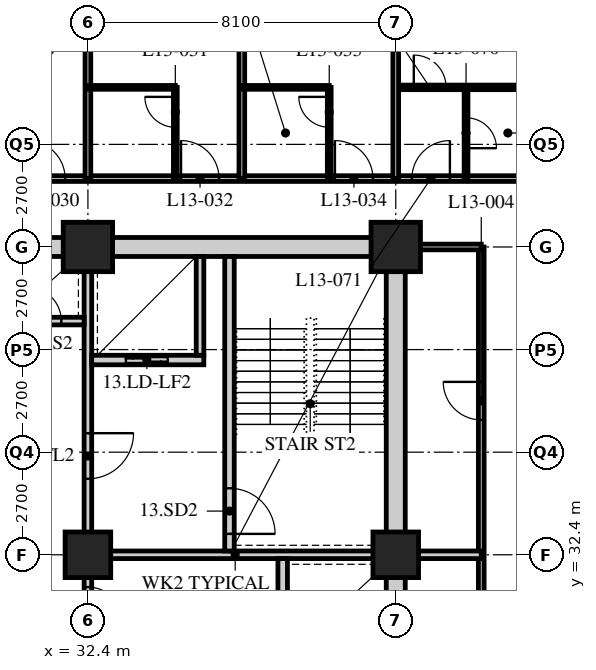
"""IFC4 building model, lengths in metres.
Left out: names, types, materials, properties, quantities, classifications, styles, units other than length and angle.
Written with IfcOpenShell. Run it as: python <this file> out.ifc"""

import sys

from ifc_helpers import new_model, si_unit, direction, frame, frame_2d, origin, origin_2d, place, context, subcontext, project, spatial, rectangle, hollow_rectangle, extrude, element, fill, save


model = new_model("IFC4")
c1 = context("Model", 3, precision=1e-05, world=origin(), true_north=direction((0.0, 1.0)))
c2 = subcontext(c1, "Body", "Model", "MODEL_VIEW")
j1 = project(units=[si_unit("LENGTHUNIT", "METRE"), si_unit("PLANEANGLEUNIT", "RADIAN")], contexts=[c1])
p1 = place(None, origin())
s1 = spatial("IfcSite", under=j1, at=p1, CompositionType="ELEMENT")
p2 = place(p1, origin())
s2 = spatial("IfcBuilding", under=s1, at=p2, CompositionType="ELEMENT")
p3 = place(p2, frame((0.0, 0.0, 56.8)))
s3 = spatial("IfcBuildingStorey", under=s2, at=p3, CompositionType="ELEMENT", Elevation=56.8)
p4 = place(p3, frame((32.4, 32.4, 0.0), z_axis=(0.0, 0.0, 1.0), x_axis=(1.0, 0.0, 0.0)))
e1 = element("IfcColumn", 1, at=p4, inside=s3, PredefinedType="COLUMN", context=c2, shape_type="SweptSolid", body=[
    extrude(hollow_rectangle(XDim=1.2, YDim=1.2, WallThickness=0.12, at=origin_2d()), origin(), (0.0, 0.0, 1.0), 3.4),
])
p5 = place(p3, frame((32.4, 40.5, 0.0), z_axis=(0.0, 0.0, 1.0), x_axis=(1.0, 0.0, 0.0)))
e2 = element("IfcColumn", 2, at=p5, inside=s3, PredefinedType="COLUMN", context=c2, shape_type="SweptSolid", body=[
    extrude(hollow_rectangle(XDim=1.3, YDim=1.3, WallThickness=0.13, at=origin_2d()), origin(), (0.0, 0.0, 1.0), 3.4),
])
p6 = place(p3, frame((40.5, 32.4, 0.0), z_axis=(0.0, 0.0, 1.0), x_axis=(1.0, 0.0, 0.0)))
e3 = element("IfcColumn", 3, at=p6, inside=s3, PredefinedType="COLUMN", context=c2, shape_type="SweptSolid", body=[
    extrude(hollow_rectangle(XDim=1.2, YDim=1.2, WallThickness=0.12, at=origin_2d()), origin(), (0.0, 0.0, 1.0), 3.4),
])
p7 = place(p3, frame((40.5, 40.5, 0.0), z_axis=(0.0, 0.0, 1.0), x_axis=(1.0, 0.0, 0.0)))
e4 = element("IfcColumn", 4, at=p7, inside=s3, PredefinedType="COLUMN", context=c2, shape_type="SweptSolid", body=[
    extrude(hollow_rectangle(XDim=1.3, YDim=1.3, WallThickness=0.13, at=origin_2d()), origin(), (0.0, 0.0, 1.0), 3.4),
])
p8 = place(p3, frame((12.15, 42.3, 0.0), z_axis=(0.0, 0.0, 1.0), x_axis=(1.0, 0.0, 0.0)))
e5 = element("IfcWall", 5, at=p8, inside=s3, PredefinedType="PARTITIONING", context=c2, shape_type="SweptSolid", body=[
    extrude(rectangle(XDim=32.4, YDim=0.15, at=frame_2d((16.2, 0.0))), origin(), (0.0, 0.0, 1.0), 3.19),
])
p9 = place(p8, frame((6.5, 0.0, 0.0)))
e6 = element("IfcOpeningElement", 6, at=p9, cuts=e5, PredefinedType="OPENING", context=c2, shape_type="SweptSolid", body=[
    extrude(rectangle(XDim=1.0, YDim=2.1, at=frame_2d((0.5, 1.05))), frame((0.0, 0.085, 0.0), z_axis=(0.0, -1.0, 0.0), x_axis=(1.0, 0.0, 0.0)), (0.0, 0.0, 1.0), 0.17),
])
p10 = place(p8, frame((10.55, 0.0, 0.0)))
e7 = element("IfcOpeningElement", 7, at=p10, cuts=e5, PredefinedType="OPENING", context=c2, shape_type="SweptSolid", body=[
    extrude(rectangle(XDim=1.0, YDim=2.1, at=frame_2d((0.5, 1.05))), frame((0.0, 0.085, 0.0), z_axis=(0.0, -1.0, 0.0), x_axis=(1.0, 0.0, 0.0)), (0.0, 0.0, 1.0), 0.17),
])
p11 = place(p8, frame((14.6, 0.0, 0.0)))
e8 = element("IfcOpeningElement", 8, at=p11, cuts=e5, PredefinedType="OPENING", context=c2, shape_type="SweptSolid", body=[
    extrude(rectangle(XDim=1.0, YDim=2.1, at=frame_2d((0.5, 1.05))), frame((0.0, 0.085, 0.0), z_axis=(0.0, -1.0, 0.0), x_axis=(1.0, 0.0, 0.0)), (0.0, 0.0, 1.0), 0.17),
])
p12 = place(p8, frame((18.65, 0.0, 0.0)))
e9 = element("IfcOpeningElement", 9, at=p12, cuts=e5, PredefinedType="OPENING", context=c2, shape_type="SweptSolid", body=[
    extrude(rectangle(XDim=1.0, YDim=2.1, at=frame_2d((0.5, 1.05))), frame((0.0, 0.085, 0.0), z_axis=(0.0, -1.0, 0.0), x_axis=(1.0, 0.0, 0.0)), (0.0, 0.0, 1.0), 0.17),
])
p13 = place(p8, frame((22.7, 0.0, 0.0)))
e10 = element("IfcOpeningElement", 10, at=p13, cuts=e5, PredefinedType="OPENING", context=c2, shape_type="SweptSolid", body=[
    extrude(rectangle(XDim=1.0, YDim=2.1, at=frame_2d((0.5, 1.05))), frame((0.0, 0.085, 0.0), z_axis=(0.0, -1.0, 0.0), x_axis=(1.0, 0.0, 0.0)), (0.0, 0.0, 1.0), 0.17),
])
p14 = place(p8, frame((26.75, 0.0, 0.0)))
e11 = element("IfcOpeningElement", 11, at=p14, cuts=e5, PredefinedType="OPENING", context=c2, shape_type="SweptSolid", body=[
    extrude(rectangle(XDim=1.0, YDim=2.1, at=frame_2d((0.5, 1.05))), frame((0.0, 0.085, 0.0), z_axis=(0.0, -1.0, 0.0), x_axis=(1.0, 0.0, 0.0)), (0.0, 0.0, 1.0), 0.17),
])
p15 = place(p8, frame((28.775, 0.0, 0.0)))
e12 = element("IfcOpeningElement", 12, at=p15, cuts=e5, PredefinedType="OPENING", context=c2, shape_type="SweptSolid", body=[
    extrude(rectangle(XDim=1.0, YDim=2.1, at=frame_2d((0.5, 1.05))), frame((0.0, 0.085, 0.0), z_axis=(0.0, -1.0, 0.0), x_axis=(1.0, 0.0, 0.0)), (0.0, 0.0, 1.0), 0.17),
])
p16 = place(p8, frame((2.625, 0.0, 0.0)))
e13 = element("IfcOpeningElement", 13, at=p16, cuts=e5, PredefinedType="OPENING", context=c2, shape_type="SweptSolid", body=[
    extrude(rectangle(XDim=1.0, YDim=2.1, at=frame_2d((0.5, 1.05))), frame((0.0, 0.085, 0.0), z_axis=(0.0, -1.0, 0.0), x_axis=(1.0, 0.0, 0.0)), (0.0, 0.0, 1.0), 0.17),
])
p17 = place(p3, frame((42.75, 13.95, 0.0), z_axis=(0.0, 0.0, 1.0), x_axis=(0.0, 1.0, 0.0)))
e14 = element("IfcWall", 14, at=p17, inside=s3, PredefinedType="PARTITIONING", context=c2, shape_type="SweptSolid", body=[
    extrude(rectangle(XDim=26.55, YDim=0.15, at=frame_2d((13.275, 0.0))), origin(), (0.0, 0.0, 1.0), 3.19),
])
p18 = place(p17, frame((13.9, 0.0, 0.0)))
e15 = element("IfcOpeningElement", 15, at=p18, cuts=e14, PredefinedType="OPENING", context=c2, shape_type="SweptSolid", body=[
    extrude(rectangle(XDim=1.0, YDim=2.1, at=frame_2d((0.5, 1.05))), frame((0.0, 0.085, 0.0), z_axis=(0.0, -1.0, 0.0), x_axis=(1.0, 0.0, 0.0)), (0.0, 0.0, 1.0), 0.17),
])
p19 = place(p17, frame((22.0, 0.0, 0.0)))
e16 = element("IfcOpeningElement", 16, at=p19, cuts=e14, PredefinedType="OPENING", context=c2, shape_type="SweptSolid", body=[
    extrude(rectangle(XDim=1.0, YDim=2.1, at=frame_2d((0.5, 1.05))), frame((0.0, 0.085, 0.0), z_axis=(0.0, -1.0, 0.0), x_axis=(1.0, 0.0, 0.0)), (0.0, 0.0, 1.0), 0.17),
])
p20 = place(p3, frame((42.75, 40.5, 0.0), z_axis=(0.0, 0.0, 1.0), x_axis=(-1.0, 0.0, 0.0)))
e17 = element("IfcWall", 17, at=p20, inside=s3, PredefinedType="PARTITIONING", context=c2, shape_type="SweptSolid", body=[
    extrude(rectangle(XDim=2.05, YDim=0.15, at=frame_2d((1.025, 0.0))), origin(), (0.0, 0.0, 1.0), 2.578),
])
p21 = place(p3, frame((40.5, 32.4, 0.0), z_axis=(0.0, 0.0, 1.0), x_axis=(1.0, 0.0, 0.0)))
e18 = element("IfcWall", 18, at=p21, inside=s3, PredefinedType="SOLIDWALL", context=c2, shape_type="SweptSolid", body=[
    extrude(rectangle(XDim=2.25, YDim=0.2, at=frame_2d((1.125, 0.0))), origin(), (0.0, 0.0, 1.0), 2.578),
])
p22 = place(p3, frame((32.4, 42.3, 0.0), z_axis=(0.0, 0.0, 1.0), x_axis=(0.0, 1.0, 0.0)))
e19 = element("IfcWall", 19, at=p22, inside=s3, PredefinedType="PARTITIONING", context=c2, shape_type="SweptSolid", body=[
    extrude(rectangle(XDim=6.0, YDim=0.15, at=frame_2d((3.0, 0.0))), origin(), (0.0, 0.0, 1.0), 2.578),
])
p23 = place(p3, frame((32.4, 44.7, 0.0), z_axis=(0.0, 0.0, 1.0), x_axis=(1.0, 0.0, 0.0)))
e20 = element("IfcWall", 20, at=p23, inside=s3, PredefinedType="PARTITIONING", context=c2, shape_type="SweptSolid", body=[
    extrude(rectangle(XDim=2.3, YDim=0.1, at=frame_2d((1.15, 0.0))), origin(), (0.0, 0.0, 1.0), 3.19),
])
p24 = place(p3, frame((34.7, 42.3, 0.0), z_axis=(0.0, 0.0, 1.0), x_axis=(0.0, 1.0, 0.0)))
e21 = element("IfcWall", 21, at=p24, inside=s3, PredefinedType="PARTITIONING", context=c2, shape_type="SweptSolid", body=[
    extrude(rectangle(XDim=2.4, YDim=0.1, at=frame_2d((1.2, 0.0))), origin(), (0.0, 0.0, 1.0), 3.19),
])
p25 = place(p24, frame((1.35, 0.0, 0.0)))
e22 = element("IfcOpeningElement", 22, at=p25, cuts=e21, PredefinedType="OPENING", context=c2, shape_type="SweptSolid", body=[
    extrude(rectangle(XDim=0.8, YDim=2.1, at=frame_2d((0.4, 1.05))), frame((0.0, 0.06, 0.0), z_axis=(0.0, -1.0, 0.0), x_axis=(1.0, 0.0, 0.0)), (0.0, 0.0, 1.0), 0.12),
])
p26 = place(p3, frame((36.45, 42.3, 0.0), z_axis=(0.0, 0.0, 1.0), x_axis=(0.0, 1.0, 0.0)))
e23 = element("IfcWall", 23, at=p26, inside=s3, PredefinedType="PARTITIONING", context=c2, shape_type="SweptSolid", body=[
    extrude(rectangle(XDim=6.0, YDim=0.15, at=frame_2d((3.0, 0.0))), origin(), (0.0, 0.0, 1.0), 3.19),
])
p27 = place(p3, frame((36.45, 44.7, 0.0), z_axis=(0.0, 0.0, 1.0), x_axis=(1.0, 0.0, 0.0)))
e24 = element("IfcWall", 24, at=p27, inside=s3, PredefinedType="PARTITIONING", context=c2, shape_type="SweptSolid", body=[
    extrude(rectangle(XDim=2.3, YDim=0.1, at=frame_2d((1.15, 0.0))), origin(), (0.0, 0.0, 1.0), 3.19),
])
p28 = place(p3, frame((38.75, 42.3, 0.0), z_axis=(0.0, 0.0, 1.0), x_axis=(0.0, 1.0, 0.0)))
e25 = element("IfcWall", 25, at=p28, inside=s3, PredefinedType="PARTITIONING", context=c2, shape_type="SweptSolid", body=[
    extrude(rectangle(XDim=2.4, YDim=0.1, at=frame_2d((1.2, 0.0))), origin(), (0.0, 0.0, 1.0), 3.19),
])
p29 = place(p28, frame((1.35, 0.0, 0.0)))
e26 = element("IfcOpeningElement", 26, at=p29, cuts=e25, PredefinedType="OPENING", context=c2, shape_type="SweptSolid", body=[
    extrude(rectangle(XDim=0.8, YDim=2.1, at=frame_2d((0.4, 1.05))), frame((0.0, 0.06, 0.0), z_axis=(0.0, -1.0, 0.0), x_axis=(1.0, 0.0, 0.0)), (0.0, 0.0, 1.0), 0.12),
])
p30 = place(p3, frame((40.5, 44.7, 0.0), z_axis=(0.0, 0.0, 1.0), x_axis=(1.0, 0.0, 0.0)))
e27 = element("IfcWall", 27, at=p30, inside=s3, PredefinedType="PARTITIONING", context=c2, shape_type="SweptSolid", body=[
    extrude(rectangle(XDim=4.05, YDim=0.12, at=frame_2d((2.025, 0.0))), origin(), (0.0, 0.0, 1.0), 3.19),
])
p31 = place(p30, frame((0.475, 0.0, 0.0)))
e28 = element("IfcOpeningElement", 28, at=p31, cuts=e27, PredefinedType="OPENING", context=c2, shape_type="SweptSolid", body=[
    extrude(rectangle(XDim=0.85, YDim=2.1, at=frame_2d((0.425, 1.05))), frame((0.0, 0.07, 0.0), z_axis=(0.0, -1.0, 0.0), x_axis=(1.0, 0.0, 0.0)), (0.0, 0.0, 1.0), 0.14),
])
p32 = place(p3, frame((42.35, 42.3, 0.0), z_axis=(0.0, 0.0, 1.0), x_axis=(0.0, 1.0, 0.0)))
e29 = element("IfcWall", 29, at=p32, inside=s3, PredefinedType="PARTITIONING", context=c2, shape_type="SweptSolid", body=[
    extrude(rectangle(XDim=2.4, YDim=0.1, at=frame_2d((1.2, 0.0))), origin(), (0.0, 0.0, 1.0), 3.19),
])
p33 = place(p32, frame((0.8, 0.0, 0.0)))
e30 = element("IfcOpeningElement", 30, at=p33, cuts=e29, PredefinedType="OPENING", context=c2, shape_type="SweptSolid", body=[
    extrude(rectangle(XDim=0.8, YDim=2.1, at=frame_2d((0.4, 1.05))), frame((0.0, 0.06, 0.0), z_axis=(0.0, -1.0, 0.0), x_axis=(1.0, 0.0, 0.0)), (0.0, 0.0, 1.0), 0.12),
])
p34 = place(p3, frame((40.5, 42.3, 0.0), z_axis=(0.0, 0.0, 1.0), x_axis=(0.0, 1.0, 0.0)))
e31 = element("IfcWall", 31, at=p34, inside=s3, PredefinedType="PARTITIONING", context=c2, shape_type="SweptSolid", body=[
    extrude(rectangle(XDim=6.0, YDim=0.15, at=frame_2d((3.0, 0.0))), origin(), (0.0, 0.0, 1.0), 2.578),
])
p35 = place(p3, frame((15.95, 40.5, 0.0), z_axis=(0.0, 0.0, 1.0), x_axis=(1.0, 0.0, 0.0)))
e32 = element("IfcWall", 32, at=p35, inside=s3, PredefinedType="SOLIDWALL", context=c2, shape_type="SweptSolid", body=[
    extrude(rectangle(XDim=24.8, YDim=0.5, at=frame_2d((12.4, 0.0))), origin(), (0.0, 0.0, 1.0), 2.54),
])
p36 = place(p35, frame((11.5, 0.0, 0.0)))
e33 = element("IfcOpeningElement", 33, at=p36, cuts=e32, PredefinedType="OPENING", context=c2, shape_type="SweptSolid", body=[
    extrude(rectangle(XDim=1.8, YDim=2.4, at=frame_2d((0.9, 1.2))), frame((0.0, 0.26, 0.0), z_axis=(0.0, -1.0, 0.0), x_axis=(1.0, 0.0, 0.0)), (0.0, 0.0, 1.0), 0.52),
])
p37 = place(p3, frame((40.5, 24.55, 0.0), z_axis=(0.0, 0.0, 1.0), x_axis=(0.0, 1.0, 0.0)))
e34 = element("IfcWall", 34, at=p37, inside=s3, PredefinedType="SOLIDWALL", context=c2, shape_type="SweptSolid", body=[
    extrude(rectangle(XDim=15.7, YDim=0.5, at=frame_2d((7.85, 0.0))), origin(), (0.0, 0.0, 1.0), 2.578),
])
p38 = place(p3, frame((32.3, 32.4, 0.0), z_axis=(0.0, 0.0, 1.0), x_axis=(1.0, 0.0, 0.0)))
e35 = element("IfcWall", 35, at=p38, inside=s3, PredefinedType="SOLIDWALL", context=c2, shape_type="SweptSolid", body=[
    extrude(rectangle(XDim=7.95, YDim=0.2, at=frame_2d((3.975, 0.0))), origin(), (0.0, 0.0, 1.0), 2.578),
])
p39 = place(p3, frame((32.4, 32.5, 0.0), z_axis=(0.0, 0.0, 1.0), x_axis=(0.0, 1.0, 0.0)))
e36 = element("IfcWall", 36, at=p39, inside=s3, PredefinedType="SOLIDWALL", context=c2, shape_type="SweptSolid", body=[
    extrude(rectangle(XDim=7.75, YDim=0.2, at=frame_2d((3.875, 0.0))), origin(), (0.0, 0.0, 1.0), 2.578),
])
p40 = place(p39, frame((1.9, 0.0, 0.0)))
e37 = element("IfcOpeningElement", 37, at=p40, cuts=e36, PredefinedType="OPENING", context=c2, shape_type="SweptSolid", body=[
    extrude(rectangle(XDim=1.2, YDim=2.1, at=frame_2d((0.6, 1.05))), frame((0.0, 0.11, 0.0), z_axis=(0.0, -1.0, 0.0), x_axis=(1.0, 0.0, 0.0)), (0.0, 0.0, 1.0), 0.22),
])
p41 = place(p3, frame((37.525, 24.55, 0.0), z_axis=(0.0, 0.0, 1.0), x_axis=(0.0, 1.0, 0.0)))
e38 = element("IfcWall", 38, at=p41, inside=s3, PredefinedType="SOLIDWALL", context=c2, shape_type="SweptSolid", body=[
    extrude(rectangle(XDim=7.75, YDim=0.25, at=frame_2d((3.875, 0.0))), origin(), (0.0, 0.0, 1.0), 3.19),
])
p42 = place(p3, frame((36.125, 32.5, 0.0), z_axis=(0.0, 0.0, 1.0), x_axis=(0.0, 1.0, 0.0)))
e39 = element("IfcWall", 39, at=p42, inside=s3, PredefinedType="SOLIDWALL", context=c2, shape_type="SweptSolid", body=[
    extrude(rectangle(XDim=7.75, YDim=0.25, at=frame_2d((3.875, 0.0))), origin(), (0.0, 0.0, 1.0), 3.19),
])
p43 = place(p42, frame((0.45, 0.0, 0.0)))
e40 = element("IfcOpeningElement", 40, at=p43, cuts=e39, PredefinedType="OPENING", context=c2, shape_type="SweptSolid", body=[
    extrude(rectangle(XDim=1.2, YDim=2.1, at=frame_2d((0.6, 1.05))), frame((0.0, 0.135, 0.0), z_axis=(0.0, -1.0, 0.0), x_axis=(1.0, 0.0, 0.0)), (0.0, 0.0, 1.0), 0.27),
])
p44 = place(p3, frame((32.5, 37.525, 0.0), z_axis=(0.0, 0.0, 1.0), x_axis=(1.0, 0.0, 0.0)))
e41 = element("IfcWall", 41, at=p44, inside=s3, PredefinedType="SOLIDWALL", context=c2, shape_type="SweptSolid", body=[
    extrude(rectangle(XDim=2.95, YDim=0.25, at=frame_2d((1.475, 0.0))), origin(), (0.0, 0.0, 1.0), 3.19),
])
p45 = place(p44, frame((0.9, 0.0, 0.0)))
e42 = element("IfcOpeningElement", 42, at=p45, cuts=e41, PredefinedType="OPENING", context=c2, shape_type="SweptSolid", body=[
    extrude(rectangle(XDim=1.1, YDim=2.4, at=frame_2d((0.55, 1.2))), frame((0.0, 0.135, 0.0), z_axis=(0.0, -1.0, 0.0), x_axis=(1.0, 0.0, 0.0)), (0.0, 0.0, 1.0), 0.27),
])
p46 = place(p3, frame((35.35, 37.65, 0.0), z_axis=(0.0, 0.0, 1.0), x_axis=(0.0, 1.0, 0.0)))
e43 = element("IfcWall", 43, at=p46, inside=s3, PredefinedType="SOLIDWALL", context=c2, shape_type="SweptSolid", body=[
    extrude(rectangle(XDim=2.6, YDim=0.2, at=frame_2d((1.3, 0.0))), origin(), (0.0, 0.0, 1.0), 3.19),
])
p47 = place(p3, frame((30.15, 38.55, 0.0), z_axis=(0.0, 0.0, 1.0), x_axis=(1.0, 0.0, 0.0)))
e44 = element("IfcWall", 44, at=p47, inside=s3, PredefinedType="SOLIDWALL", context=c2, shape_type="SweptSolid", body=[
    extrude(rectangle(XDim=2.15, YDim=0.2, at=frame_2d((1.075, 0.0))), origin(), (0.0, 0.0, 1.0), 3.19),
])
p48 = place(p47, frame((0.65, 0.0, 0.0)))
e45 = element("IfcOpeningElement", 45, at=p48, cuts=e44, PredefinedType="OPENING", context=c2, shape_type="SweptSolid", body=[
    extrude(rectangle(XDim=0.9, YDim=2.1, at=frame_2d((0.45, 1.05))), frame((0.0, 0.11, 0.0), z_axis=(0.0, -1.0, 0.0), x_axis=(1.0, 0.0, 0.0)), (0.0, 0.0, 1.0), 0.22),
])
p49 = place(p3, frame((32.4, 24.55, 0.0), z_axis=(0.0, 0.0, 1.0), x_axis=(0.0, 1.0, 0.0)))
e46 = element("IfcWall", 46, at=p49, inside=s3, PredefinedType="PARTITIONING", context=c2, shape_type="SweptSolid", body=[
    extrude(rectangle(XDim=7.75, YDim=0.2, at=frame_2d((3.875, 0.0))), origin(), (0.0, 0.0, 1.0), 2.578),
])
p50 = place(p49, frame((1.0, 0.0, 0.0)))
e47 = element("IfcOpeningElement", 47, at=p50, cuts=e46, PredefinedType="OPENING", context=c2, shape_type="SweptSolid", body=[
    extrude(rectangle(XDim=1.0, YDim=2.1, at=frame_2d((0.5, 1.05))), frame((0.0, 0.11, 0.0), z_axis=(0.0, -1.0, 0.0), x_axis=(1.0, 0.0, 0.0)), (0.0, 0.0, 1.0), 0.22),
])
p51 = place(p49, frame((3.925, 0.0, 0.0)))
e48 = element("IfcOpeningElement", 48, at=p51, cuts=e46, PredefinedType="OPENING", context=c2, shape_type="SweptSolid", body=[
    extrude(rectangle(XDim=1.0, YDim=2.1, at=frame_2d((0.5, 1.05))), frame((0.0, 0.11, 0.0), z_axis=(0.0, -1.0, 0.0), x_axis=(1.0, 0.0, 0.0)), (0.0, 0.0, 1.0), 0.22),
])
p52 = place(p49, frame((6.1, 0.0, 0.0)))
e49 = element("IfcOpeningElement", 49, at=p52, cuts=e46, PredefinedType="OPENING", context=c2, shape_type="SweptSolid", body=[
    extrude(rectangle(XDim=0.9, YDim=2.1, at=frame_2d((0.45, 1.05))), frame((0.0, 0.11, 0.0), z_axis=(0.0, -1.0, 0.0), x_axis=(1.0, 0.0, 0.0)), (0.0, 0.0, 1.0), 0.22),
])
p53 = place(p19, origin())
e50 = element("IfcDoor", 50, at=p53, inside=s3, OperationType="SINGLE_SWING_RIGHT", PredefinedType="DOOR", context=c2, shape_type="SweptSolid", body=[
    extrude(rectangle(XDim=1.0, YDim=2.1, at=frame_2d((0.5, 1.05))), frame((0.0, 0.025, 0.0), z_axis=(0.0, -1.0, 0.0), x_axis=(1.0, 0.0, 0.0)), (0.0, 0.0, 1.0), 0.05),
])
fill(e16, e50)
p54 = place(p12, origin())
e51 = element("IfcDoor", 51, at=p54, inside=s3, OperationType="SINGLE_SWING_LEFT", PredefinedType="DOOR", context=c2, shape_type="SweptSolid", body=[
    extrude(rectangle(XDim=1.0, YDim=2.1, at=frame_2d((0.5, 1.05))), frame((0.0, 0.025, 0.0), z_axis=(0.0, -1.0, 0.0), x_axis=(1.0, 0.0, 0.0)), (0.0, 0.0, 1.0), 0.05),
])
fill(e9, e51)
p55 = place(p25, origin())
e52 = element("IfcDoor", 52, at=p55, inside=s3, OperationType="SINGLE_SWING_RIGHT", PredefinedType="DOOR", context=c2, shape_type="SweptSolid", body=[
    extrude(rectangle(XDim=0.8, YDim=2.1, at=frame_2d((0.4, 1.05))), frame((0.0, 0.025, 0.0), z_axis=(0.0, -1.0, 0.0), x_axis=(1.0, 0.0, 0.0)), (0.0, 0.0, 1.0), 0.05),
])
fill(e22, e52)
p56 = place(p13, origin())
e53 = element("IfcDoor", 53, at=p56, inside=s3, OperationType="SINGLE_SWING_LEFT", PredefinedType="DOOR", context=c2, shape_type="SweptSolid", body=[
    extrude(rectangle(XDim=1.0, YDim=2.1, at=frame_2d((0.5, 1.05))), frame((0.0, 0.025, 0.0), z_axis=(0.0, -1.0, 0.0), x_axis=(1.0, 0.0, 0.0)), (0.0, 0.0, 1.0), 0.05),
])
fill(e10, e53)
p57 = place(p29, origin())
e54 = element("IfcDoor", 54, at=p57, inside=s3, OperationType="SINGLE_SWING_RIGHT", PredefinedType="DOOR", context=c2, shape_type="SweptSolid", body=[
    extrude(rectangle(XDim=0.8, YDim=2.1, at=frame_2d((0.4, 1.05))), frame((0.0, 0.025, 0.0), z_axis=(0.0, -1.0, 0.0), x_axis=(1.0, 0.0, 0.0)), (0.0, 0.0, 1.0), 0.05),
])
fill(e26, e54)
p58 = place(p14, origin())
e55 = element("IfcDoor", 55, at=p58, inside=s3, OperationType="SINGLE_SWING_LEFT", PredefinedType="DOOR", context=c2, shape_type="SweptSolid", body=[
    extrude(rectangle(XDim=1.0, YDim=2.1, at=frame_2d((0.5, 1.05))), frame((0.0, 0.025, 0.0), z_axis=(0.0, -1.0, 0.0), x_axis=(1.0, 0.0, 0.0)), (0.0, 0.0, 1.0), 0.05),
])
fill(e11, e55)
p59 = place(p33, origin())
e56 = element("IfcDoor", 56, at=p59, inside=s3, OperationType="SINGLE_SWING_RIGHT", PredefinedType="DOOR", context=c2, shape_type="SweptSolid", body=[
    extrude(rectangle(XDim=0.8, YDim=2.1, at=frame_2d((0.4, 1.05))), frame((0.0, 0.025, 0.0), z_axis=(0.0, -1.0, 0.0), x_axis=(1.0, 0.0, 0.0)), (0.0, 0.0, 1.0), 0.05),
])
fill(e30, e56)
p60 = place(p15, origin())
e57 = element("IfcDoor", 57, at=p60, inside=s3, OperationType="SINGLE_SWING_RIGHT", PredefinedType="DOOR", context=c2, shape_type="SweptSolid", body=[
    extrude(rectangle(XDim=1.0, YDim=2.1, at=frame_2d((0.5, 1.05))), frame((0.0, 0.025, 0.0), z_axis=(0.0, -1.0, 0.0), x_axis=(1.0, 0.0, 0.0)), (0.0, 0.0, 1.0), 0.05),
])
fill(e12, e57)
p61 = place(p31, origin())
e58 = element("IfcDoor", 58, at=p61, inside=s3, OperationType="SINGLE_SWING_LEFT", PredefinedType="DOOR", context=c2, shape_type="SweptSolid", body=[
    extrude(rectangle(XDim=0.85, YDim=2.1, at=frame_2d((0.425, 1.05))), frame((0.0, 0.025, 0.0), z_axis=(0.0, -1.0, 0.0), x_axis=(1.0, 0.0, 0.0)), (0.0, 0.0, 1.0), 0.05),
])
fill(e28, e58)
p62 = place(p52, origin())
e59 = element("IfcDoor", 59, at=p62, inside=s3, OperationType="SINGLE_SWING_RIGHT", PredefinedType="DOOR", context=c2, shape_type="SweptSolid", body=[
    extrude(rectangle(XDim=0.9, YDim=2.1, at=frame_2d((0.45, 1.05))), frame((0.0, 0.025, 0.0), z_axis=(0.0, -1.0, 0.0), x_axis=(1.0, 0.0, 0.0)), (0.0, 0.0, 1.0), 0.05),
])
fill(e49, e59)
p63 = place(p43, origin())
e60 = element("IfcDoor", 60, at=p63, inside=s3, OperationType="SINGLE_SWING_RIGHT", PredefinedType="DOOR", context=c2, shape_type="SweptSolid", body=[
    extrude(rectangle(XDim=1.2, YDim=2.1, at=frame_2d((0.6, 1.05))), frame((0.0, 0.025, 0.0), z_axis=(0.0, -1.0, 0.0), x_axis=(1.0, 0.0, 0.0)), (0.0, 0.0, 1.0), 0.05),
])
fill(e40, e60)
p64 = place(p40, origin())
e61 = element("IfcDoor", 61, at=p64, inside=s3, OperationType="SINGLE_SWING_LEFT", PredefinedType="DOOR", context=c2, shape_type="SweptSolid", body=[
    extrude(rectangle(XDim=1.2, YDim=2.1, at=frame_2d((0.6, 1.05))), frame((0.0, 0.025, 0.0), z_axis=(0.0, -1.0, 0.0), x_axis=(1.0, 0.0, 0.0)), (0.0, 0.0, 1.0), 0.05),
])
fill(e37, e61)
p65 = place(p48, origin())
e62 = element("IfcDoor", 62, at=p65, inside=s3, OperationType="SINGLE_SWING_LEFT", PredefinedType="DOOR", context=c2, shape_type="SweptSolid", body=[
    extrude(rectangle(XDim=0.9, YDim=2.1, at=frame_2d((0.45, 1.05))), frame((0.0, 0.025, 0.0), z_axis=(0.0, -1.0, 0.0), x_axis=(1.0, 0.0, 0.0)), (0.0, 0.0, 1.0), 0.05),
])
fill(e45, e62)
p66 = place(p45, origin())
e63 = element("IfcDoor", 63, at=p66, inside=s3, OperationType="DOUBLE_DOOR_SLIDING", PredefinedType="DOOR", context=c2, shape_type="SweptSolid", body=[
    extrude(rectangle(XDim=1.1, YDim=2.4, at=frame_2d((0.55, 1.2))), frame((0.0, 0.025, 0.0), z_axis=(0.0, -1.0, 0.0), x_axis=(1.0, 0.0, 0.0)), (0.0, 0.0, 1.0), 0.05),
])
fill(e42, e63)
save(model, sys.argv[1])
